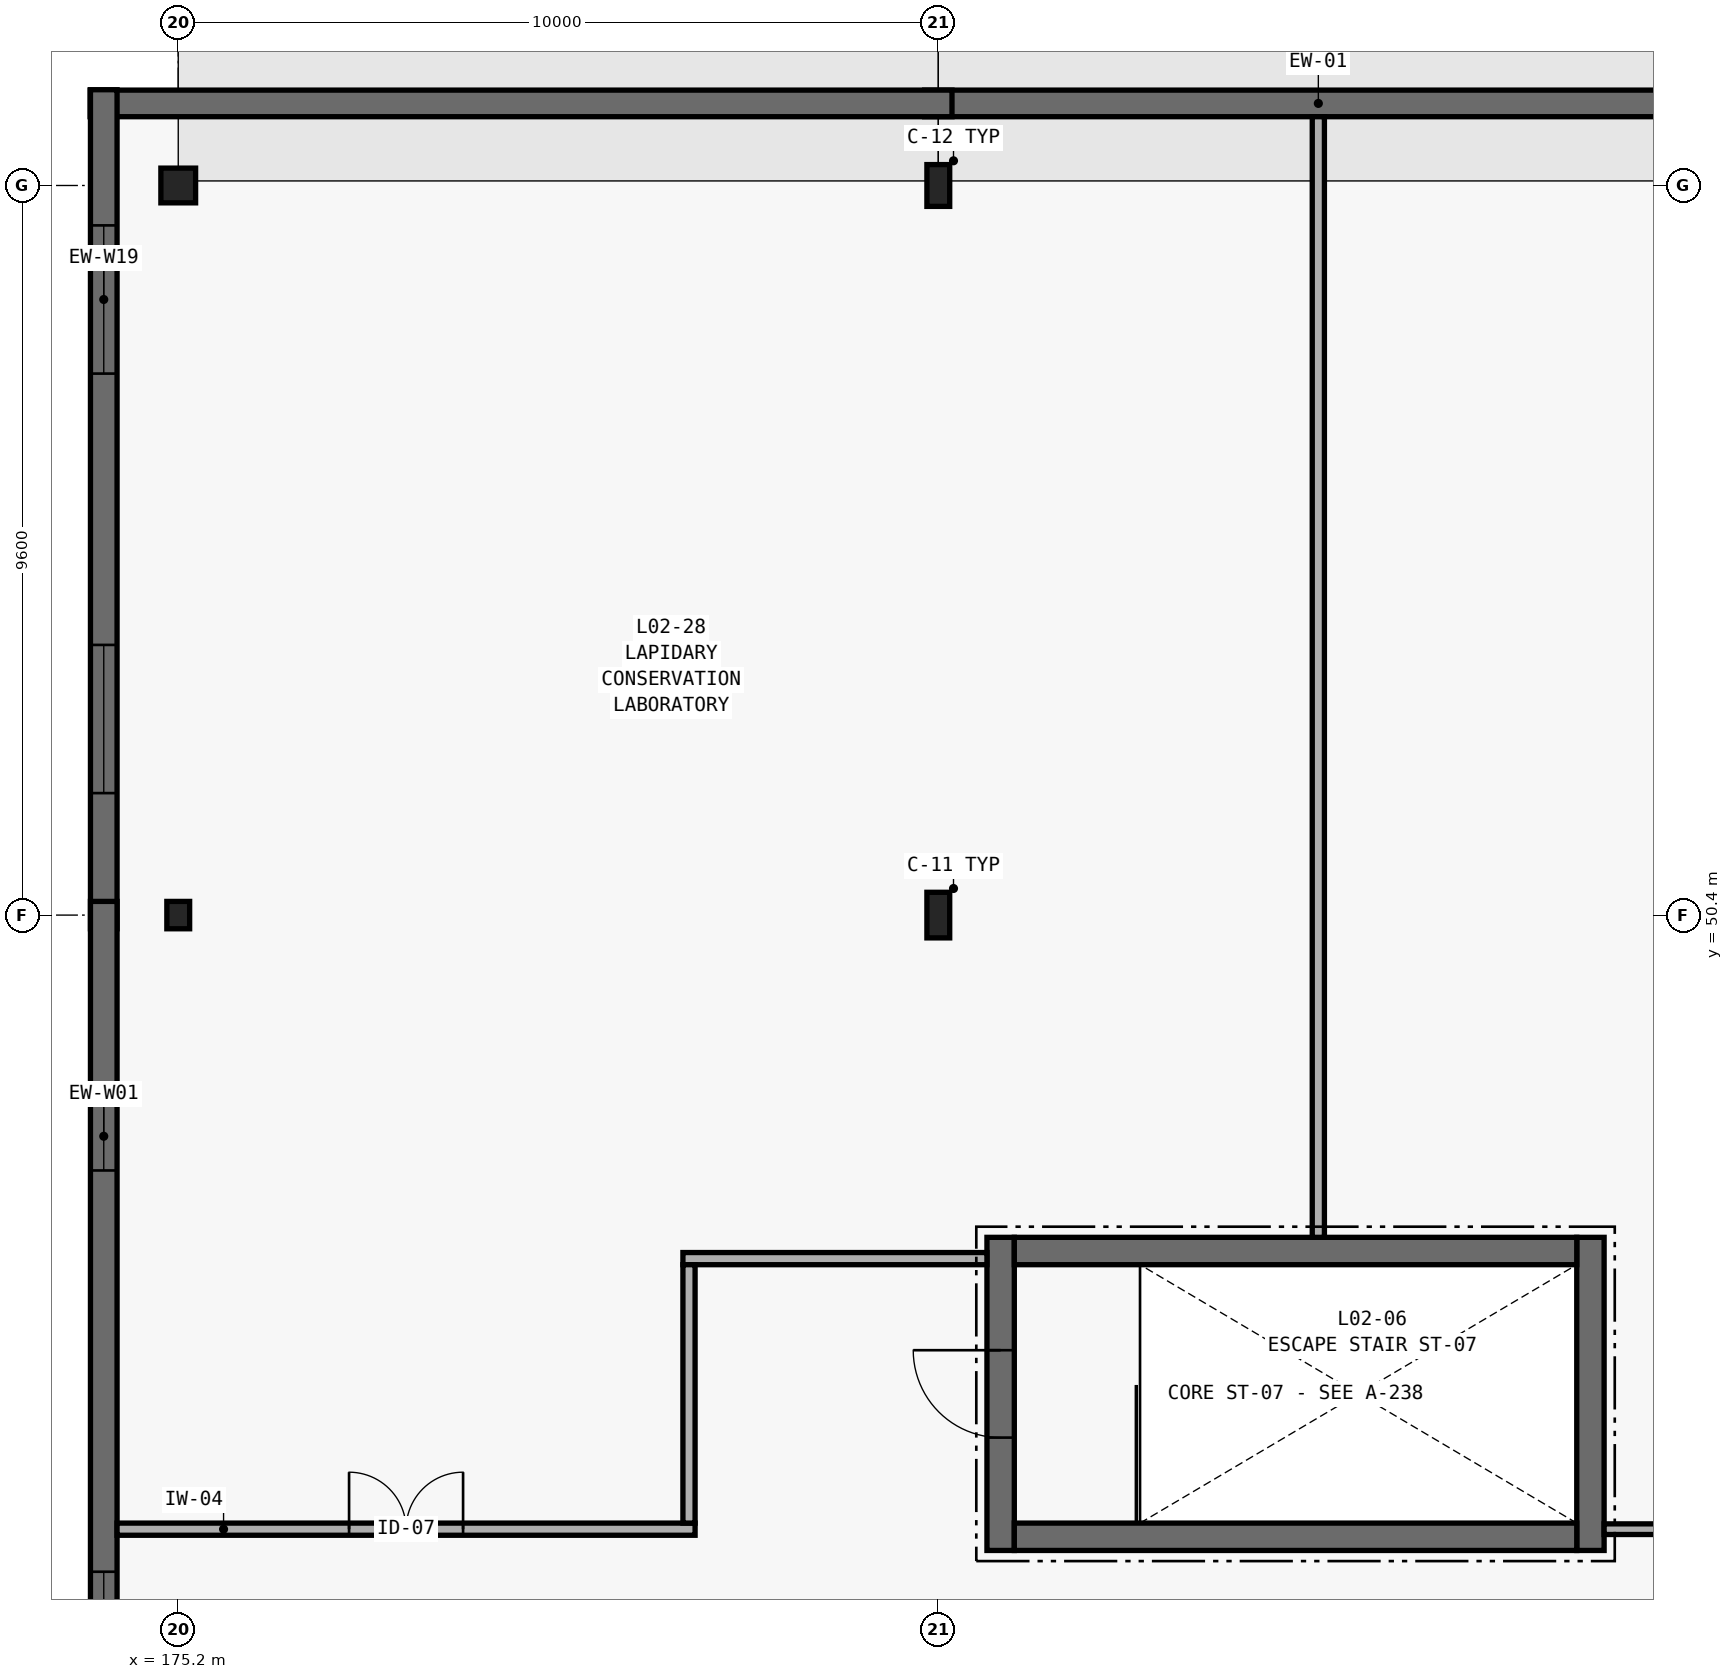
"""IFC4 building model, lengths in metres.
Left out: names, types, materials, properties, quantities, classifications, styles, units other than length and angle.
Written with IfcOpenShell. Run it as: python <this file> out.ifc"""

import sys

from ifc_helpers import new_model, si_unit, direction, frame, frame_2d, origin, origin_2d, place, context, subcontext, project, spatial, rectangle, hollow_circle, i_section, extrude, element, fill, save


model = new_model("IFC4")
c1 = context("Model", 3, precision=1e-05, world=origin(), true_north=direction((0.0, 1.0)))
c2 = subcontext(c1, "Body", "Model", "MODEL_VIEW")
j1 = project(units=[si_unit("LENGTHUNIT", "METRE"), si_unit("PLANEANGLEUNIT", "RADIAN")], contexts=[c1])
p1 = place(None, origin())
s1 = spatial("IfcSite", under=j1, at=p1, CompositionType="ELEMENT")
p2 = place(p1, origin())
s2 = spatial("IfcBuilding", under=s1, at=p2, CompositionType="ELEMENT")
p3 = place(p2, frame((0.0, 0.0, 9.0)))
s3 = spatial("IfcBuildingStorey", under=s2, at=p3, CompositionType="ELEMENT", Elevation=9.0)
p4 = place(p3, frame((175.2, 50.4, 0.0), z_axis=(0.0, 0.0, 1.0), x_axis=(1.0, 0.0, 0.0)))
e1 = element("IfcColumn", 1, at=p4, inside=s3, PredefinedType="COLUMN", context=c2, shape_type="SweptSolid", body=[
    extrude(i_section(OverallWidth=0.3, OverallDepth=0.36, WebThickness=0.012, FlangeThickness=0.022, FilletRadius=0.027, at=origin_2d()), origin(), (0.0, 0.0, 1.0), 8.1),
])
p5 = place(p3, frame((175.2, 60.0, 0.0), z_axis=(0.0, 0.0, 1.0), x_axis=(1.0, 0.0, 0.0)))
e2 = element("IfcColumn", 2, at=p5, inside=s3, PredefinedType="COLUMN", context=c2, shape_type="SweptSolid", body=[
    extrude(hollow_circle(Radius=0.229, WallThickness=0.02, at=origin_2d()), origin(), (0.0, 0.0, 1.0), 8.1),
])
p6 = place(p3, frame((185.2, 50.4, 0.0), z_axis=(0.0, 0.0, 1.0), x_axis=(1.0, 0.0, 0.0)))
e3 = element("IfcColumn", 3, at=p6, inside=s3, PredefinedType="COLUMN", context=c2, shape_type="SweptSolid", body=[
    extrude(i_section(OverallWidth=0.3, OverallDepth=0.6, WebThickness=0.015, FlangeThickness=0.03, FilletRadius=0.027, at=origin_2d()), origin(), (0.0, 0.0, 1.0), 8.1),
])
p7 = place(p3, frame((185.2, 60.0, 0.0), z_axis=(0.0, 0.0, 1.0), x_axis=(1.0, 0.0, 0.0)))
e4 = element("IfcColumn", 4, at=p7, inside=s3, PredefinedType="COLUMN", context=c2, shape_type="SweptSolid", body=[
    extrude(i_section(OverallWidth=0.3, OverallDepth=0.55, WebThickness=0.015, FlangeThickness=0.029, FilletRadius=0.027, at=origin_2d()), origin(), (0.0, 0.0, 1.0), 8.1),
])
p8 = place(p3, frame((195.38, 61.08, 0.0), z_axis=(0.0, 0.0, 1.0), x_axis=(-1.0, 0.0, 0.0)))
e5 = element("IfcWall", 5, at=p8, inside=s3, PredefinedType="STANDARD", context=c2, shape_type="SweptSolid", body=[
    extrude(rectangle(XDim=10.36, YDim=0.35, at=frame_2d((5.18, 0.0))), origin(), (0.0, 0.0, 1.0), 7.8),
])
p9 = place(p3, frame((185.38, 61.08, 0.0), z_axis=(0.0, 0.0, 1.0), x_axis=(-1.0, 0.0, 0.0)))
e6 = element("IfcWall", 6, at=p9, inside=s3, PredefinedType="STANDARD", context=c2, shape_type="SweptSolid", body=[
    extrude(rectangle(XDim=11.34, YDim=0.35, at=frame_2d((5.67, 0.0))), origin(), (0.0, 0.0, 1.0), 7.8),
])
p10 = place(p3, frame((174.22, 61.26, 0.0), z_axis=(0.0, 0.0, 1.0), x_axis=(0.0, -1.0, 0.0)))
e7 = element("IfcWall", 7, at=p10, inside=s3, PredefinedType="STANDARD", context=c2, shape_type="SweptSolid", body=[
    extrude(rectangle(XDim=11.04, YDim=0.35, at=frame_2d((5.52, 0.0))), origin(), (0.0, 0.0, 1.0), 7.8),
])
p11 = place(p10, frame((1.785, 0.0, 0.9)))
e8 = element("IfcOpeningElement", 8, at=p11, cuts=e7, PredefinedType="OPENING", context=c2, shape_type="SweptSolid", body=[
    extrude(rectangle(XDim=1.95, YDim=1.8, at=frame_2d((0.975, 0.9))), frame((0.0, 0.19, 0.0), z_axis=(0.0, -1.0, 0.0), x_axis=(1.0, 0.0, 0.0)), (0.0, 0.0, 1.0), 0.38),
])
p12 = place(p10, frame((7.305, 0.0, 0.9)))
e9 = element("IfcOpeningElement", 9, at=p12, cuts=e7, PredefinedType="OPENING", context=c2, shape_type="SweptSolid", body=[
    extrude(rectangle(XDim=1.95, YDim=1.8, at=frame_2d((0.975, 0.9))), frame((0.0, 0.19, 0.0), z_axis=(0.0, -1.0, 0.0), x_axis=(1.0, 0.0, 0.0)), (0.0, 0.0, 1.0), 0.38),
])
p13 = place(p3, frame((174.22, 50.58, 0.0), z_axis=(0.0, 0.0, 1.0), x_axis=(0.0, -1.0, 0.0)))
e10 = element("IfcWall", 10, at=p13, inside=s3, PredefinedType="STANDARD", context=c2, shape_type="SweptSolid", body=[
    extrude(rectangle(XDim=12.36, YDim=0.35, at=frame_2d((6.18, 0.0))), origin(), (0.0, 0.0, 1.0), 7.8),
])
p14 = place(p13, frame((2.64, 0.0, 0.9)))
e11 = element("IfcOpeningElement", 11, at=p14, cuts=e10, PredefinedType="OPENING", context=c2, shape_type="SweptSolid", body=[
    extrude(rectangle(XDim=0.9, YDim=2.4, at=frame_2d((0.45, 1.2))), frame((0.0, 0.19, 0.0), z_axis=(0.0, -1.0, 0.0), x_axis=(1.0, 0.0, 0.0)), (0.0, 0.0, 1.0), 0.38),
])
p15 = place(p13, frame((8.82, 0.0, 0.9)))
e12 = element("IfcOpeningElement", 12, at=p15, cuts=e10, PredefinedType="OPENING", context=c2, shape_type="SweptSolid", body=[
    extrude(rectangle(XDim=0.9, YDim=2.4, at=frame_2d((0.45, 1.2))), frame((0.0, 0.19, 0.0), z_axis=(0.0, -1.0, 0.0), x_axis=(1.0, 0.0, 0.0)), (0.0, 0.0, 1.0), 0.38),
])
p16 = place(p3, frame((186.02, 42.04, 0.0), z_axis=(0.0, 0.0, 1.0), x_axis=(0.0, 1.0, 0.0)))
e13 = element("IfcWall", 13, at=p16, inside=s3, PredefinedType="SHEAR", context=c2, shape_type="SweptSolid", body=[
    extrude(rectangle(XDim=4.12, YDim=0.36, at=frame_2d((2.06, 0.0))), origin(), (0.0, 0.0, 1.0), 7.82),
])
p17 = place(p16, frame((1.485, 0.0, 0.0)))
e14 = element("IfcOpeningElement", 14, at=p17, cuts=e13, PredefinedType="OPENING", context=c2, shape_type="SweptSolid", body=[
    extrude(rectangle(XDim=1.15, YDim=2.15, at=frame_2d((0.575, 1.075))), frame((0.0, 0.195, 0.0), z_axis=(0.0, -1.0, 0.0), x_axis=(1.0, 0.0, 0.0)), (0.0, 0.0, 1.0), 0.39),
])
p18 = place(p3, frame((193.78, 42.04, 0.0), z_axis=(0.0, 0.0, 1.0), x_axis=(0.0, 1.0, 0.0)))
e15 = element("IfcWall", 15, at=p18, inside=s3, PredefinedType="SHEAR", context=c2, shape_type="SweptSolid", body=[
    extrude(rectangle(XDim=4.12, YDim=0.36, at=frame_2d((2.06, 0.0))), origin(), (0.0, 0.0, 1.0), 7.82),
])
for number, where, z_axis, x_axis in (
    (16, (186.2, 45.98, 0.0), (0.0, 0.0, 1.0), (1.0, 0.0, 0.0)),
    (17, (186.2, 42.22, 0.0), (0.0, 0.0, 1.0), (1.0, 0.0, 0.0)),
):
    element("IfcWall", number, at=place(p3, frame(where, z_axis=z_axis, x_axis=x_axis)), inside=s3, PredefinedType="SHEAR", context=c2, shape_type="SweptSolid", body=[
        extrude(rectangle(XDim=7.4, YDim=0.36, at=frame_2d((3.7, 0.0))), origin(), (0.0, 0.0, 1.0), 7.82),
    ])
p19 = place(p3, frame((174.395, 42.32, 0.0), z_axis=(0.0, 0.0, 1.0), x_axis=(1.0, 0.0, 0.0)))
e18 = element("IfcWall", 18, at=p19, inside=s3, PredefinedType="PARTITIONING", context=c2, shape_type="SweptSolid", body=[
    extrude(rectangle(XDim=7.605, YDim=0.16, at=frame_2d((3.802, 0.0))), origin(), (0.0, 0.0, 1.0), 6.7),
])
p20 = place(p19, frame((3.052, 0.0, 0.0)))
e19 = element("IfcOpeningElement", 19, at=p20, cuts=e18, PredefinedType="OPENING", context=c2, shape_type="SweptSolid", body=[
    extrude(rectangle(XDim=1.5, YDim=2.2, at=frame_2d((0.75, 1.1))), frame((0.0, 0.095, 0.0), z_axis=(0.0, -1.0, 0.0), x_axis=(1.0, 0.0, 0.0)), (0.0, 0.0, 1.0), 0.19),
])
p21 = place(p3, frame((193.96, 42.32, 0.0), z_axis=(0.0, 0.0, 1.0), x_axis=(1.0, 0.0, 0.0)))
e20 = element("IfcWall", 20, at=p21, inside=s3, PredefinedType="PARTITIONING", context=c2, shape_type="SweptSolid", body=[
    extrude(rectangle(XDim=12.045, YDim=0.14, at=frame_2d((6.022, 0.0))), origin(), (0.0, 0.0, 1.0), 6.7),
])
p22 = place(p21, frame((5.522, 0.0, 0.0)))
e21 = element("IfcOpeningElement", 21, at=p22, cuts=e20, PredefinedType="OPENING", context=c2, shape_type="SweptSolid", body=[
    extrude(rectangle(XDim=1.0, YDim=2.15, at=frame_2d((0.5, 1.075))), frame((0.0, 0.085, 0.0), z_axis=(0.0, -1.0, 0.0), x_axis=(1.0, 0.0, 0.0)), (0.0, 0.0, 1.0), 0.17),
])
p23 = place(p3, frame((181.84, 45.88, 0.0), z_axis=(0.0, 0.0, 1.0), x_axis=(1.0, 0.0, 0.0)))
e22 = element("IfcWall", 22, at=p23, inside=s3, PredefinedType="PARTITIONING", context=c2, shape_type="SweptSolid", body=[
    extrude(rectangle(XDim=4.0, YDim=0.16, at=frame_2d((2.0, 0.0))), origin(), (0.0, 0.0, 1.0), 6.7),
])
p24 = place(p3, frame((181.92, 42.4, 0.0), z_axis=(0.0, 0.0, 1.0), x_axis=(0.0, 1.0, 0.0)))
e23 = element("IfcWall", 23, at=p24, inside=s3, PredefinedType="PARTITIONING", context=c2, shape_type="SweptSolid", body=[
    extrude(rectangle(XDim=3.4, YDim=0.16, at=frame_2d((1.7, 0.0))), origin(), (0.0, 0.0, 1.0), 6.7),
])
p25 = place(p3, frame((190.2, 46.16, 0.0), z_axis=(0.0, 0.0, 1.0), x_axis=(0.0, 1.0, 0.0)))
e24 = element("IfcWall", 24, at=p25, inside=s3, PredefinedType="PARTITIONING", context=c2, shape_type="SweptSolid", body=[
    extrude(rectangle(XDim=14.745, YDim=0.16, at=frame_2d((7.373, 0.0))), origin(), (0.0, 0.0, 1.0), 6.7),
])
p26 = place(p11, origin())
e25 = element("IfcWindow", 25, at=p26, inside=s3, PartitioningType="SINGLE_PANEL", PredefinedType="WINDOW", context=c2, shape_type="SweptSolid", body=[
    extrude(rectangle(XDim=1.95, YDim=1.8, at=frame_2d((0.975, 0.9))), frame((0.0, 0.03, 0.0), z_axis=(0.0, -1.0, 0.0), x_axis=(1.0, 0.0, 0.0)), (0.0, 0.0, 1.0), 0.06),
])
fill(e8, e25)
p27 = place(p12, origin())
e26 = element("IfcWindow", 26, at=p27, inside=s3, PartitioningType="SINGLE_PANEL", PredefinedType="WINDOW", context=c2, shape_type="SweptSolid", body=[
    extrude(rectangle(XDim=1.95, YDim=1.8, at=frame_2d((0.975, 0.9))), frame((0.0, 0.03, 0.0), z_axis=(0.0, -1.0, 0.0), x_axis=(1.0, 0.0, 0.0)), (0.0, 0.0, 1.0), 0.06),
])
fill(e9, e26)
p28 = place(p14, origin())
e27 = element("IfcWindow", 27, at=p28, inside=s3, PartitioningType="SINGLE_PANEL", PredefinedType="WINDOW", context=c2, shape_type="SweptSolid", body=[
    extrude(rectangle(XDim=0.9, YDim=2.4, at=frame_2d((0.45, 1.2))), frame((0.0, 0.03, 0.0), z_axis=(0.0, -1.0, 0.0), x_axis=(1.0, 0.0, 0.0)), (0.0, 0.0, 1.0), 0.06),
])
fill(e11, e27)
p29 = place(p15, origin())
e28 = element("IfcWindow", 28, at=p29, inside=s3, PartitioningType="SINGLE_PANEL", PredefinedType="WINDOW", context=c2, shape_type="SweptSolid", body=[
    extrude(rectangle(XDim=0.9, YDim=2.4, at=frame_2d((0.45, 1.2))), frame((0.0, 0.03, 0.0), z_axis=(0.0, -1.0, 0.0), x_axis=(1.0, 0.0, 0.0)), (0.0, 0.0, 1.0), 0.06),
])
fill(e12, e28)
p30 = place(p17, origin())
e29 = element("IfcDoor", 29, at=p30, inside=s3, OperationType="SINGLE_SWING_RIGHT", PredefinedType="DOOR", context=c2, shape_type="SweptSolid", body=[
    extrude(rectangle(XDim=1.15, YDim=2.15, at=frame_2d((0.575, 1.075))), frame((0.0, 0.025, 0.0), z_axis=(0.0, -1.0, 0.0), x_axis=(1.0, 0.0, 0.0)), (0.0, 0.0, 1.0), 0.05),
])
fill(e14, e29)
p31 = place(p20, origin())
e30 = element("IfcDoor", 30, at=p31, inside=s3, OperationType="DOUBLE_DOOR_SINGLE_SWING", PredefinedType="DOOR", context=c2, shape_type="SweptSolid", body=[
    extrude(rectangle(XDim=1.5, YDim=2.2, at=frame_2d((0.75, 1.1))), frame((0.0, 0.025, 0.0), z_axis=(0.0, -1.0, 0.0), x_axis=(1.0, 0.0, 0.0)), (0.0, 0.0, 1.0), 0.05),
])
fill(e19, e30)
save(model, sys.argv[1])
